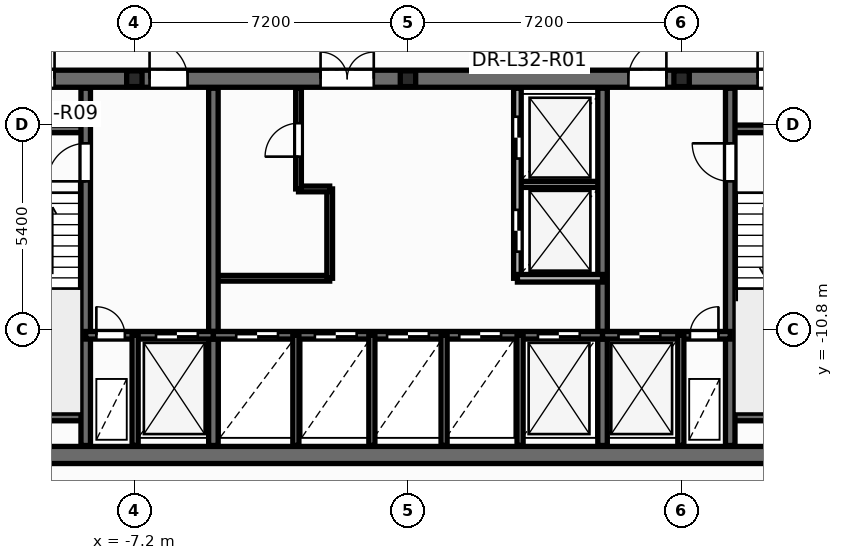
"""IFC4 building model, lengths in metres.
Left out: names, types, materials, properties, quantities, classifications, styles, units other than length and angle.
Written with IfcOpenShell. Run it as: python <this file> out.ifc"""

import sys

from ifc_helpers import new_model, si_unit, direction, frame, frame_2d, origin, origin_2d, place, context, subcontext, project, spatial, rectangle, i_section, extrude, element, fill, save


model = new_model("IFC4")
c1 = context("Model", 3, precision=1e-05, world=origin(), true_north=direction((0.0, 1.0)))
c2 = subcontext(c1, "Body", "Model", "MODEL_VIEW")
j1 = project(units=[si_unit("LENGTHUNIT", "METRE"), si_unit("PLANEANGLEUNIT", "RADIAN")], contexts=[c1])
p1 = place(None, origin())
s1 = spatial("IfcSite", under=j1, at=p1, CompositionType="ELEMENT")
p2 = place(p1, origin())
s2 = spatial("IfcBuilding", under=s1, at=p2, CompositionType="ELEMENT")
p3 = place(p2, frame((0.0, 0.0, 125.7)))
s3 = spatial("IfcBuildingStorey", under=s2, at=p3, CompositionType="ELEMENT", Elevation=125.7)
for number, where, z_axis, x_axis in (
    (1, (-7.2, -4.2, 0.0), (0.0, 0.0, 1.0), (1.0, 0.0, 0.0)),
    (2, (0.0, -4.2, 0.0), (0.0, 0.0, 1.0), (1.0, 0.0, 0.0)),
    (3, (7.2, -4.2, 0.0), (0.0, 0.0, 1.0), (1.0, 0.0, 0.0)),
):
    element("IfcColumn", number, at=place(p3, frame(where, z_axis=z_axis, x_axis=x_axis)), inside=s3, PredefinedType="PILASTER", context=c2, shape_type="SweptSolid", body=[
        extrude(i_section(OverallWidth=0.405, OverallDepth=0.414, WebThickness=0.022, FlangeThickness=0.032, at=origin_2d()), origin(), (0.0, 0.0, 1.0), 3.6),
    ])
p4 = place(p3, frame((-5.12, -9.45, 0.0), z_axis=(0.0, 0.0, 1.0), x_axis=(1.0, 0.0, 0.0)))
e4 = element("IfcWall", 4, at=p4, inside=s3, PredefinedType="PARTITIONING", context=c2, shape_type="SweptSolid", body=[
    extrude(rectangle(XDim=3.06, YDim=0.15, at=frame_2d((1.53, 0.0))), origin(), (0.0, 0.0, 1.0), 3.35),
])
p5 = place(p3, frame((-2.06, -9.45, 0.0), z_axis=(0.0, 0.0, 1.0), x_axis=(0.0, 1.0, 0.0)))
e5 = element("IfcWall", 5, at=p5, inside=s3, PredefinedType="PARTITIONING", context=c2, shape_type="SweptSolid", body=[
    extrude(rectangle(XDim=2.35, YDim=0.15, at=frame_2d((1.175, 0.0))), origin(), (0.0, 0.0, 1.0), 3.35),
])
p6 = place(p3, frame((-2.88, -7.1, 0.0), z_axis=(0.0, 0.0, 1.0), x_axis=(1.0, 0.0, 0.0)))
e6 = element("IfcWall", 6, at=p6, inside=s3, PredefinedType="PARTITIONING", context=c2, shape_type="SweptSolid", body=[
    extrude(rectangle(XDim=0.82, YDim=0.15, at=frame_2d((0.41, 0.0))), origin(), (0.0, 0.0, 1.0), 3.35),
])
p7 = place(p3, frame((-2.88, -7.1, 0.0), z_axis=(0.0, 0.0, 1.0), x_axis=(0.0, 1.0, 0.0)))
e7 = element("IfcWall", 7, at=p7, inside=s3, PredefinedType="PARTITIONING", context=c2, shape_type="SweptSolid", body=[
    extrude(rectangle(XDim=2.65, YDim=0.15, at=frame_2d((1.325, 0.0))), origin(), (0.0, 0.0, 1.0), 3.35),
])
p8 = place(p7, frame((0.85, 0.0, 0.0)))
e8 = element("IfcOpeningElement", 8, at=p8, cuts=e7, PredefinedType="OPENING", context=c2, shape_type="SweptSolid", body=[
    extrude(rectangle(XDim=0.886, YDim=2.104, at=frame_2d((0.44, 1.052))), frame((0.0, 0.085, 0.0), z_axis=(0.0, -1.0, 0.0), x_axis=(1.0, 0.0, 0.0)), (0.0, 0.0, 1.0), 0.17),
])
p9 = place(p3, frame((2.88, -6.98, 0.0), z_axis=(0.0, 0.0, 1.0), x_axis=(1.0, 0.0, 0.0)))
e9 = element("IfcWall", 9, at=p9, inside=s3, PredefinedType="PARTITIONING", context=c2, shape_type="SweptSolid", body=[
    extrude(rectangle(XDim=2.24, YDim=0.16, at=frame_2d((1.12, 0.0))), origin(), (0.0, 0.0, 1.0), 3.35),
])
p10 = place(p3, frame((-12.65, -14.1, 0.0), z_axis=(0.0, 0.0, 1.0), x_axis=(1.0, 0.0, 0.0)))
e10 = element("IfcWall", 10, at=p10, inside=s3, PredefinedType="SHEAR", context=c2, shape_type="SweptSolid", body=[
    extrude(rectangle(XDim=25.3, YDim=0.45, at=frame_2d((12.65, 0.0))), origin(), (0.0, 0.0, 1.0), 3.6),
])
p11 = place(p3, frame((-12.65, -4.2, 0.0), z_axis=(0.0, 0.0, 1.0), x_axis=(1.0, 0.0, 0.0)))
e11 = element("IfcWall", 11, at=p11, inside=s3, PredefinedType="SHEAR", context=c2, shape_type="SweptSolid", body=[
    extrude(rectangle(XDim=25.3, YDim=0.45, at=frame_2d((12.65, 0.0))), origin(), (0.0, 0.0, 1.0), 3.6),
])
p12 = place(p11, frame((0.95, 0.0, 0.0)))
e12 = element("IfcOpeningElement", 12, at=p12, cuts=e11, PredefinedType="OPENING", context=c2, shape_type="SweptSolid", body=[
    extrude(rectangle(XDim=0.756, YDim=2.054, at=frame_2d((0.375, 1.027))), frame((0.0, 0.235, 0.0), z_axis=(0.0, -1.0, 0.0), x_axis=(1.0, 0.0, 0.0)), (0.0, 0.0, 1.0), 0.47),
])
p13 = place(p11, frame((2.6, 0.0, 0.0)))
e13 = element("IfcOpeningElement", 13, at=p13, cuts=e11, PredefinedType="OPENING", context=c2, shape_type="SweptSolid", body=[
    extrude(rectangle(XDim=0.756, YDim=2.054, at=frame_2d((0.375, 1.027))), frame((0.0, 0.235, 0.0), z_axis=(0.0, -1.0, 0.0), x_axis=(1.0, 0.0, 0.0)), (0.0, 0.0, 1.0), 0.47),
])
p14 = place(p11, frame((21.85, 0.0, 0.0)))
e14 = element("IfcOpeningElement", 14, at=p14, cuts=e11, PredefinedType="OPENING", context=c2, shape_type="SweptSolid", body=[
    extrude(rectangle(XDim=0.756, YDim=2.054, at=frame_2d((0.375, 1.027))), frame((0.0, 0.235, 0.0), z_axis=(0.0, -1.0, 0.0), x_axis=(1.0, 0.0, 0.0)), (0.0, 0.0, 1.0), 0.47),
])
p15 = place(p11, frame((23.5, 0.0, 0.0)))
e15 = element("IfcOpeningElement", 15, at=p15, cuts=e11, PredefinedType="OPENING", context=c2, shape_type="SweptSolid", body=[
    extrude(rectangle(XDim=0.756, YDim=2.054, at=frame_2d((0.375, 1.027))), frame((0.0, 0.235, 0.0), z_axis=(0.0, -1.0, 0.0), x_axis=(1.0, 0.0, 0.0)), (0.0, 0.0, 1.0), 0.47),
])
p16 = place(p11, frame((5.85, 0.0, 0.0)))
e16 = element("IfcOpeningElement", 16, at=p16, cuts=e11, PredefinedType="OPENING", context=c2, shape_type="SweptSolid", body=[
    extrude(rectangle(XDim=1.006, YDim=2.104, at=frame_2d((0.5, 1.052))), frame((0.0, 0.235, 0.0), z_axis=(0.0, -1.0, 0.0), x_axis=(1.0, 0.0, 0.0)), (0.0, 0.0, 1.0), 0.47),
])
p17 = place(p11, frame((10.35, 0.0, 0.0)))
e17 = element("IfcOpeningElement", 17, at=p17, cuts=e11, PredefinedType="OPENING", context=c2, shape_type="SweptSolid", body=[
    extrude(rectangle(XDim=1.406, YDim=2.154, at=frame_2d((0.7, 1.077))), frame((0.0, 0.235, 0.0), z_axis=(0.0, -1.0, 0.0), x_axis=(1.0, 0.0, 0.0)), (0.0, 0.0, 1.0), 0.47),
])
p18 = place(p11, frame((18.45, 0.0, 0.0)))
e18 = element("IfcOpeningElement", 18, at=p18, cuts=e11, PredefinedType="OPENING", context=c2, shape_type="SweptSolid", body=[
    extrude(rectangle(XDim=1.006, YDim=2.104, at=frame_2d((0.5, 1.052))), frame((0.0, 0.235, 0.0), z_axis=(0.0, -1.0, 0.0), x_axis=(1.0, 0.0, 0.0)), (0.0, 0.0, 1.0), 0.47),
])
for number, where, z_axis, x_axis in (
    (19, (-12.35, -5.52, 0.0), (0.0, 0.0, 1.0), (1.0, 0.0, 0.0)),
    (20, (-12.35, -13.1, 0.0), (0.0, 0.0, 1.0), (1.0, 0.0, 0.0)),
    (21, (8.48, -5.52, 0.0), (0.0, 0.0, 1.0), (1.0, 0.0, 0.0)),
    (22, (8.48, -13.1, 0.0), (0.0, 0.0, 1.0), (1.0, 0.0, 0.0)),
):
    element("IfcWall", number, at=place(p3, frame(where, z_axis=z_axis, x_axis=x_axis)), inside=s3, PredefinedType="SOLIDWALL", context=c2, shape_type="SweptSolid", body=[
        extrude(rectangle(XDim=3.87, YDim=0.2, at=frame_2d((1.935, 0.0))), origin(), (0.0, 0.0, 1.0), 3.6),
    ])
p19 = place(p3, frame((-8.48, -13.85, 0.0), z_axis=(0.0, 0.0, 1.0), x_axis=(0.0, 1.0, 0.0)))
e23 = element("IfcWall", 23, at=p19, inside=s3, PredefinedType="SHEAR", context=c2, shape_type="SweptSolid", body=[
    extrude(rectangle(XDim=9.4, YDim=0.25, at=frame_2d((4.7, 0.0))), origin(), (0.0, 0.0, 1.0), 3.6),
])
p20 = place(p19, frame((6.95, 0.0, 0.0)))
e24 = element("IfcOpeningElement", 24, at=p20, cuts=e23, PredefinedType="OPENING", context=c2, shape_type="SweptSolid", body=[
    extrude(rectangle(XDim=1.006, YDim=2.104, at=frame_2d((0.5, 1.052))), frame((0.0, 0.135, 0.0), z_axis=(0.0, -1.0, 0.0), x_axis=(1.0, 0.0, 0.0)), (0.0, 0.0, 1.0), 0.27),
])
p21 = place(p3, frame((8.48, -13.85, 0.0), z_axis=(0.0, 0.0, 1.0), x_axis=(0.0, 1.0, 0.0)))
e25 = element("IfcWall", 25, at=p21, inside=s3, PredefinedType="SHEAR", context=c2, shape_type="SweptSolid", body=[
    extrude(rectangle(XDim=9.4, YDim=0.25, at=frame_2d((4.7, 0.0))), origin(), (0.0, 0.0, 1.0), 3.6),
])
p22 = place(p21, frame((6.95, 0.0, 0.0)))
e26 = element("IfcOpeningElement", 26, at=p22, cuts=e25, PredefinedType="OPENING", context=c2, shape_type="SweptSolid", body=[
    extrude(rectangle(XDim=1.006, YDim=2.104, at=frame_2d((0.5, 1.052))), frame((0.0, 0.135, 0.0), z_axis=(0.0, -1.0, 0.0), x_axis=(1.0, 0.0, 0.0)), (0.0, 0.0, 1.0), 0.27),
])
for number, where, z_axis, x_axis in (
    (27, (-5.12, -13.85, 0.0), (0.0, 0.0, 1.0), (0.0, 1.0, 0.0)),
    (28, (5.12, -13.85, 0.0), (0.0, 0.0, 1.0), (0.0, 1.0, 0.0)),
):
    element("IfcWall", number, at=place(p3, frame(where, z_axis=z_axis, x_axis=x_axis)), inside=s3, PredefinedType="SHEAR", context=c2, shape_type="SweptSolid", body=[
        extrude(rectangle(XDim=9.4, YDim=0.25, at=frame_2d((4.7, 0.0))), origin(), (0.0, 0.0, 1.0), 3.6),
    ])
p23 = place(p3, frame((-8.48, -10.95, 0.0), z_axis=(0.0, 0.0, 1.0), x_axis=(1.0, 0.0, 0.0)))
e29 = element("IfcWall", 29, at=p23, inside=s3, PredefinedType="SOLIDWALL", context=c2, shape_type="SweptSolid", body=[
    extrude(rectangle(XDim=3.36, YDim=0.2, at=frame_2d((1.68, 0.0))), origin(), (0.0, 0.0, 1.0), 3.6),
])
p24 = place(p23, frame((0.28, 0.0, 0.0)))
e30 = element("IfcOpeningElement", 30, at=p24, cuts=e29, PredefinedType="OPENING", context=c2, shape_type="SweptSolid", body=[
    extrude(rectangle(XDim=0.756, YDim=2.054, at=frame_2d((0.375, 1.027))), frame((0.0, 0.11, 0.0), z_axis=(0.0, -1.0, 0.0), x_axis=(1.0, 0.0, 0.0)), (0.0, 0.0, 1.0), 0.22),
])
p25 = place(p23, frame((1.85, 0.0, 0.0)))
e31 = element("IfcOpeningElement", 31, at=p25, cuts=e29, PredefinedType="OPENING", context=c2, shape_type="SweptSolid", body=[
    extrude(rectangle(XDim=1.106, YDim=2.104, at=frame_2d((0.55, 1.052))), frame((0.0, 0.11, 0.0), z_axis=(0.0, -1.0, 0.0), x_axis=(1.0, 0.0, 0.0)), (0.0, 0.0, 1.0), 0.22),
])
p26 = place(p3, frame((-5.12, -10.95, 0.0), z_axis=(0.0, 0.0, 1.0), x_axis=(1.0, 0.0, 0.0)))
e32 = element("IfcWall", 32, at=p26, inside=s3, PredefinedType="SOLIDWALL", context=c2, shape_type="SweptSolid", body=[
    extrude(rectangle(XDim=10.24, YDim=0.2, at=frame_2d((5.12, 0.0))), origin(), (0.0, 0.0, 1.0), 3.6),
])
p27 = place(p26, frame((0.6, 0.0, 0.0)))
e33 = element("IfcOpeningElement", 33, at=p27, cuts=e32, PredefinedType="OPENING", context=c2, shape_type="SweptSolid", body=[
    extrude(rectangle(XDim=1.106, YDim=2.104, at=frame_2d((0.55, 1.052))), frame((0.0, 0.11, 0.0), z_axis=(0.0, -1.0, 0.0), x_axis=(1.0, 0.0, 0.0)), (0.0, 0.0, 1.0), 0.22),
])
p28 = place(p26, frame((2.67, 0.0, 0.0)))
e34 = element("IfcOpeningElement", 34, at=p28, cuts=e32, PredefinedType="OPENING", context=c2, shape_type="SweptSolid", body=[
    extrude(rectangle(XDim=1.106, YDim=2.104, at=frame_2d((0.55, 1.052))), frame((0.0, 0.11, 0.0), z_axis=(0.0, -1.0, 0.0), x_axis=(1.0, 0.0, 0.0)), (0.0, 0.0, 1.0), 0.22),
])
p29 = place(p26, frame((4.57, 0.0, 0.0)))
e35 = element("IfcOpeningElement", 35, at=p29, cuts=e32, PredefinedType="OPENING", context=c2, shape_type="SweptSolid", body=[
    extrude(rectangle(XDim=1.106, YDim=2.104, at=frame_2d((0.55, 1.052))), frame((0.0, 0.11, 0.0), z_axis=(0.0, -1.0, 0.0), x_axis=(1.0, 0.0, 0.0)), (0.0, 0.0, 1.0), 0.22),
])
p30 = place(p26, frame((6.47, 0.0, 0.0)))
e36 = element("IfcOpeningElement", 36, at=p30, cuts=e32, PredefinedType="OPENING", context=c2, shape_type="SweptSolid", body=[
    extrude(rectangle(XDim=1.106, YDim=2.104, at=frame_2d((0.55, 1.052))), frame((0.0, 0.11, 0.0), z_axis=(0.0, -1.0, 0.0), x_axis=(1.0, 0.0, 0.0)), (0.0, 0.0, 1.0), 0.22),
])
p31 = place(p26, frame((8.54, 0.0, 0.0)))
e37 = element("IfcOpeningElement", 37, at=p31, cuts=e32, PredefinedType="OPENING", context=c2, shape_type="SweptSolid", body=[
    extrude(rectangle(XDim=1.106, YDim=2.104, at=frame_2d((0.55, 1.052))), frame((0.0, 0.11, 0.0), z_axis=(0.0, -1.0, 0.0), x_axis=(1.0, 0.0, 0.0)), (0.0, 0.0, 1.0), 0.22),
])
p32 = place(p3, frame((5.12, -10.95, 0.0), z_axis=(0.0, 0.0, 1.0), x_axis=(1.0, 0.0, 0.0)))
e38 = element("IfcWall", 38, at=p32, inside=s3, PredefinedType="SOLIDWALL", context=c2, shape_type="SweptSolid", body=[
    extrude(rectangle(XDim=3.36, YDim=0.2, at=frame_2d((1.68, 0.0))), origin(), (0.0, 0.0, 1.0), 3.6),
])
p33 = place(p32, frame((0.42, 0.0, 0.0)))
e39 = element("IfcOpeningElement", 39, at=p33, cuts=e38, PredefinedType="OPENING", context=c2, shape_type="SweptSolid", body=[
    extrude(rectangle(XDim=1.106, YDim=2.104, at=frame_2d((0.55, 1.052))), frame((0.0, 0.11, 0.0), z_axis=(0.0, -1.0, 0.0), x_axis=(1.0, 0.0, 0.0)), (0.0, 0.0, 1.0), 0.22),
])
p34 = place(p32, frame((2.3, 0.0, 0.0)))
e40 = element("IfcOpeningElement", 40, at=p34, cuts=e38, PredefinedType="OPENING", context=c2, shape_type="SweptSolid", body=[
    extrude(rectangle(XDim=0.756, YDim=2.054, at=frame_2d((0.375, 1.027))), frame((0.0, 0.11, 0.0), z_axis=(0.0, -1.0, 0.0), x_axis=(1.0, 0.0, 0.0)), (0.0, 0.0, 1.0), 0.22),
])
for number, where, z_axis, x_axis in (
    (41, (-7.18, -13.85, 0.0), (0.0, 0.0, 1.0), (0.0, 1.0, 0.0)),
    (42, (7.18, -13.85, 0.0), (0.0, 0.0, 1.0), (0.0, 1.0, 0.0)),
    (43, (-2.95, -13.85, 0.0), (0.0, 0.0, 1.0), (0.0, 1.0, 0.0)),
    (44, (2.95, -13.85, 0.0), (0.0, 0.0, 1.0), (0.0, 1.0, 0.0)),
):
    element("IfcWall", number, at=place(p3, frame(where, z_axis=z_axis, x_axis=x_axis)), inside=s3, PredefinedType="PARTITIONING", context=c2, shape_type="SweptSolid", body=[
        extrude(rectangle(XDim=2.9, YDim=0.16, at=frame_2d((1.45, 0.0))), origin(), (0.0, 0.0, 1.0), 2.475),
    ])
p35 = place(p3, frame((2.88, -9.45, 0.0), z_axis=(0.0, 0.0, 1.0), x_axis=(0.0, 1.0, 0.0)))
e45 = element("IfcWall", 45, at=p35, inside=s3, PredefinedType="SOLIDWALL", context=c2, shape_type="SweptSolid", body=[
    extrude(rectangle(XDim=5.0, YDim=0.2, at=frame_2d((2.5, 0.0))), origin(), (0.0, 0.0, 1.0), 3.35),
])
p36 = place(p35, frame((0.7, 0.0, 0.0)))
e46 = element("IfcOpeningElement", 46, at=p36, cuts=e45, PredefinedType="OPENING", context=c2, shape_type="SweptSolid", body=[
    extrude(rectangle(XDim=1.106, YDim=2.104, at=frame_2d((0.55, 1.052))), frame((0.0, 0.11, 0.0), z_axis=(0.0, -1.0, 0.0), x_axis=(1.0, 0.0, 0.0)), (0.0, 0.0, 1.0), 0.22),
])
p37 = place(p35, frame((3.15, 0.0, 0.0)))
e47 = element("IfcOpeningElement", 47, at=p37, cuts=e45, PredefinedType="OPENING", context=c2, shape_type="SweptSolid", body=[
    extrude(rectangle(XDim=1.106, YDim=2.104, at=frame_2d((0.55, 1.052))), frame((0.0, 0.11, 0.0), z_axis=(0.0, -1.0, 0.0), x_axis=(1.0, 0.0, 0.0)), (0.0, 0.0, 1.0), 0.22),
])
p38 = place(p3, frame((2.88, -9.45, 0.0), z_axis=(0.0, 0.0, 1.0), x_axis=(1.0, 0.0, 0.0)))
e48 = element("IfcWall", 48, at=p38, inside=s3, PredefinedType="SOLIDWALL", context=c2, shape_type="SweptSolid", body=[
    extrude(rectangle(XDim=2.24, YDim=0.2, at=frame_2d((1.12, 0.0))), origin(), (0.0, 0.0, 1.0), 3.35),
])
for number, where, z_axis, x_axis in (
    (49, (-0.95, -13.85, 0.0), (0.0, 0.0, 1.0), (0.0, 1.0, 0.0)),
    (50, (0.95, -13.85, 0.0), (0.0, 0.0, 1.0), (0.0, 1.0, 0.0)),
):
    element("IfcWall", number, at=place(p3, frame(where, z_axis=z_axis, x_axis=x_axis)), inside=s3, PredefinedType="PARTITIONING", context=c2, shape_type="SweptSolid", body=[
        extrude(rectangle(XDim=2.9, YDim=0.16, at=frame_2d((1.45, 0.0))), origin(), (0.0, 0.0, 1.0), 2.475),
    ])
p39 = place(p8, origin())
e51 = element("IfcDoor", 51, at=p39, inside=s3, OperationType="SINGLE_SWING_LEFT", PredefinedType="DOOR", context=c2, shape_type="SweptSolid", body=[
    extrude(rectangle(XDim=0.88, YDim=2.1, at=frame_2d((0.44, 1.05))), frame((0.0, 0.025, 0.0), z_axis=(0.0, -1.0, 0.0), x_axis=(1.0, 0.0, 0.0)), (0.0, 0.0, 1.0), 0.05),
])
fill(e8, e51)
p40 = place(p36, origin())
e52 = element("IfcDoor", 52, at=p40, inside=s3, OperationType="DOUBLE_DOOR_SLIDING", PredefinedType="DOOR", context=c2, shape_type="SweptSolid", body=[
    extrude(rectangle(XDim=1.1, YDim=2.1, at=frame_2d((0.55, 1.05))), frame((0.0, 0.025, 0.0), z_axis=(0.0, -1.0, 0.0), x_axis=(1.0, 0.0, 0.0)), (0.0, 0.0, 1.0), 0.05),
])
fill(e46, e52)
p41 = place(p37, origin())
e53 = element("IfcDoor", 53, at=p41, inside=s3, OperationType="DOUBLE_DOOR_SLIDING", PredefinedType="DOOR", context=c2, shape_type="SweptSolid", body=[
    extrude(rectangle(XDim=1.1, YDim=2.1, at=frame_2d((0.55, 1.05))), frame((0.0, 0.025, 0.0), z_axis=(0.0, -1.0, 0.0), x_axis=(1.0, 0.0, 0.0)), (0.0, 0.0, 1.0), 0.05),
])
fill(e47, e53)
p42 = place(p20, origin())
e54 = element("IfcDoor", 54, at=p42, inside=s3, OperationType="SINGLE_SWING_LEFT", PredefinedType="DOOR", context=c2, shape_type="SweptSolid", body=[
    extrude(rectangle(XDim=1.0, YDim=2.1, at=frame_2d((0.5, 1.05))), frame((0.0, 0.025, 0.0), z_axis=(0.0, -1.0, 0.0), x_axis=(1.0, 0.0, 0.0)), (0.0, 0.0, 1.0), 0.05),
])
fill(e24, e54)
p43 = place(p22, origin())
e55 = element("IfcDoor", 55, at=p43, inside=s3, OperationType="SINGLE_SWING_RIGHT", PredefinedType="DOOR", context=c2, shape_type="SweptSolid", body=[
    extrude(rectangle(XDim=1.0, YDim=2.1, at=frame_2d((0.5, 1.05))), frame((0.0, 0.025, 0.0), z_axis=(0.0, -1.0, 0.0), x_axis=(1.0, 0.0, 0.0)), (0.0, 0.0, 1.0), 0.05),
])
fill(e26, e55)
p44 = place(p24, origin())
e56 = element("IfcDoor", 56, at=p44, inside=s3, OperationType="SINGLE_SWING_LEFT", PredefinedType="DOOR", context=c2, shape_type="SweptSolid", body=[
    extrude(rectangle(XDim=0.75, YDim=2.05, at=frame_2d((0.375, 1.025))), frame((0.0, 0.025, 0.0), z_axis=(0.0, -1.0, 0.0), x_axis=(1.0, 0.0, 0.0)), (0.0, 0.0, 1.0), 0.05),
])
fill(e30, e56)
p45 = place(p25, origin())
e57 = element("IfcDoor", 57, at=p45, inside=s3, OperationType="DOUBLE_DOOR_SLIDING", PredefinedType="DOOR", context=c2, shape_type="SweptSolid", body=[
    extrude(rectangle(XDim=1.1, YDim=2.1, at=frame_2d((0.55, 1.05))), frame((0.0, 0.025, 0.0), z_axis=(0.0, -1.0, 0.0), x_axis=(1.0, 0.0, 0.0)), (0.0, 0.0, 1.0), 0.05),
])
fill(e31, e57)
p46 = place(p33, origin())
e58 = element("IfcDoor", 58, at=p46, inside=s3, OperationType="DOUBLE_DOOR_SLIDING", PredefinedType="DOOR", context=c2, shape_type="SweptSolid", body=[
    extrude(rectangle(XDim=1.1, YDim=2.1, at=frame_2d((0.55, 1.05))), frame((0.0, 0.025, 0.0), z_axis=(0.0, -1.0, 0.0), x_axis=(1.0, 0.0, 0.0)), (0.0, 0.0, 1.0), 0.05),
])
fill(e39, e58)
p47 = place(p34, origin())
e59 = element("IfcDoor", 59, at=p47, inside=s3, OperationType="SINGLE_SWING_RIGHT", PredefinedType="DOOR", context=c2, shape_type="SweptSolid", body=[
    extrude(rectangle(XDim=0.75, YDim=2.05, at=frame_2d((0.375, 1.025))), frame((0.0, 0.025, 0.0), z_axis=(0.0, -1.0, 0.0), x_axis=(1.0, 0.0, 0.0)), (0.0, 0.0, 1.0), 0.05),
])
fill(e40, e59)
p48 = place(p27, origin())
e60 = element("IfcDoor", 60, at=p48, inside=s3, OperationType="DOUBLE_DOOR_SLIDING", PredefinedType="DOOR", context=c2, shape_type="SweptSolid", body=[
    extrude(rectangle(XDim=1.1, YDim=2.1, at=frame_2d((0.55, 1.05))), frame((0.0, 0.025, 0.0), z_axis=(0.0, -1.0, 0.0), x_axis=(1.0, 0.0, 0.0)), (0.0, 0.0, 1.0), 0.05),
])
fill(e33, e60)
p49 = place(p28, origin())
e61 = element("IfcDoor", 61, at=p49, inside=s3, OperationType="DOUBLE_DOOR_SLIDING", PredefinedType="DOOR", context=c2, shape_type="SweptSolid", body=[
    extrude(rectangle(XDim=1.1, YDim=2.1, at=frame_2d((0.55, 1.05))), frame((0.0, 0.025, 0.0), z_axis=(0.0, -1.0, 0.0), x_axis=(1.0, 0.0, 0.0)), (0.0, 0.0, 1.0), 0.05),
])
fill(e34, e61)
p50 = place(p29, origin())
e62 = element("IfcDoor", 62, at=p50, inside=s3, OperationType="DOUBLE_DOOR_SLIDING", PredefinedType="DOOR", context=c2, shape_type="SweptSolid", body=[
    extrude(rectangle(XDim=1.1, YDim=2.1, at=frame_2d((0.55, 1.05))), frame((0.0, 0.025, 0.0), z_axis=(0.0, -1.0, 0.0), x_axis=(1.0, 0.0, 0.0)), (0.0, 0.0, 1.0), 0.05),
])
fill(e35, e62)
p51 = place(p30, origin())
e63 = element("IfcDoor", 63, at=p51, inside=s3, OperationType="DOUBLE_DOOR_SLIDING", PredefinedType="DOOR", context=c2, shape_type="SweptSolid", body=[
    extrude(rectangle(XDim=1.1, YDim=2.1, at=frame_2d((0.55, 1.05))), frame((0.0, 0.025, 0.0), z_axis=(0.0, -1.0, 0.0), x_axis=(1.0, 0.0, 0.0)), (0.0, 0.0, 1.0), 0.05),
])
fill(e36, e63)
p52 = place(p31, origin())
e64 = element("IfcDoor", 64, at=p52, inside=s3, OperationType="DOUBLE_DOOR_SLIDING", PredefinedType="DOOR", context=c2, shape_type="SweptSolid", body=[
    extrude(rectangle(XDim=1.1, YDim=2.1, at=frame_2d((0.55, 1.05))), frame((0.0, 0.025, 0.0), z_axis=(0.0, -1.0, 0.0), x_axis=(1.0, 0.0, 0.0)), (0.0, 0.0, 1.0), 0.05),
])
fill(e37, e64)
p53 = place(p13, origin())
e65 = element("IfcDoor", 65, at=p53, inside=s3, OperationType="SINGLE_SWING_RIGHT", PredefinedType="DOOR", context=c2, shape_type="SweptSolid", body=[
    extrude(rectangle(XDim=0.75, YDim=2.05, at=frame_2d((0.375, 1.025))), frame((0.0, 0.025, 0.0), z_axis=(0.0, -1.0, 0.0), x_axis=(1.0, 0.0, 0.0)), (0.0, 0.0, 1.0), 0.05),
])
fill(e13, e65)
p54 = place(p14, origin())
e66 = element("IfcDoor", 66, at=p54, inside=s3, OperationType="SINGLE_SWING_LEFT", PredefinedType="DOOR", context=c2, shape_type="SweptSolid", body=[
    extrude(rectangle(XDim=0.75, YDim=2.05, at=frame_2d((0.375, 1.025))), frame((0.0, 0.025, 0.0), z_axis=(0.0, -1.0, 0.0), x_axis=(1.0, 0.0, 0.0)), (0.0, 0.0, 1.0), 0.05),
])
fill(e14, e66)
p55 = place(p16, origin())
e67 = element("IfcDoor", 67, at=p55, inside=s3, OperationType="SINGLE_SWING_LEFT", PredefinedType="DOOR", context=c2, shape_type="SweptSolid", body=[
    extrude(rectangle(XDim=1.0, YDim=2.1, at=frame_2d((0.5, 1.05))), frame((0.0, 0.025, 0.0), z_axis=(0.0, -1.0, 0.0), x_axis=(1.0, 0.0, 0.0)), (0.0, 0.0, 1.0), 0.05),
])
fill(e16, e67)
p56 = place(p17, origin())
e68 = element("IfcDoor", 68, at=p56, inside=s3, OperationType="DOUBLE_DOOR_SINGLE_SWING", PredefinedType="DOOR", context=c2, shape_type="SweptSolid", body=[
    extrude(rectangle(XDim=1.4, YDim=2.15, at=frame_2d((0.7, 1.075))), frame((0.0, 0.025, 0.0), z_axis=(0.0, -1.0, 0.0), x_axis=(1.0, 0.0, 0.0)), (0.0, 0.0, 1.0), 0.05),
])
fill(e17, e68)
p57 = place(p18, origin())
e69 = element("IfcDoor", 69, at=p57, inside=s3, OperationType="SINGLE_SWING_RIGHT", PredefinedType="DOOR", context=c2, shape_type="SweptSolid", body=[
    extrude(rectangle(XDim=1.0, YDim=2.1, at=frame_2d((0.5, 1.05))), frame((0.0, 0.025, 0.0), z_axis=(0.0, -1.0, 0.0), x_axis=(1.0, 0.0, 0.0)), (0.0, 0.0, 1.0), 0.05),
])
fill(e18, e69)
save(model, sys.argv[1])
